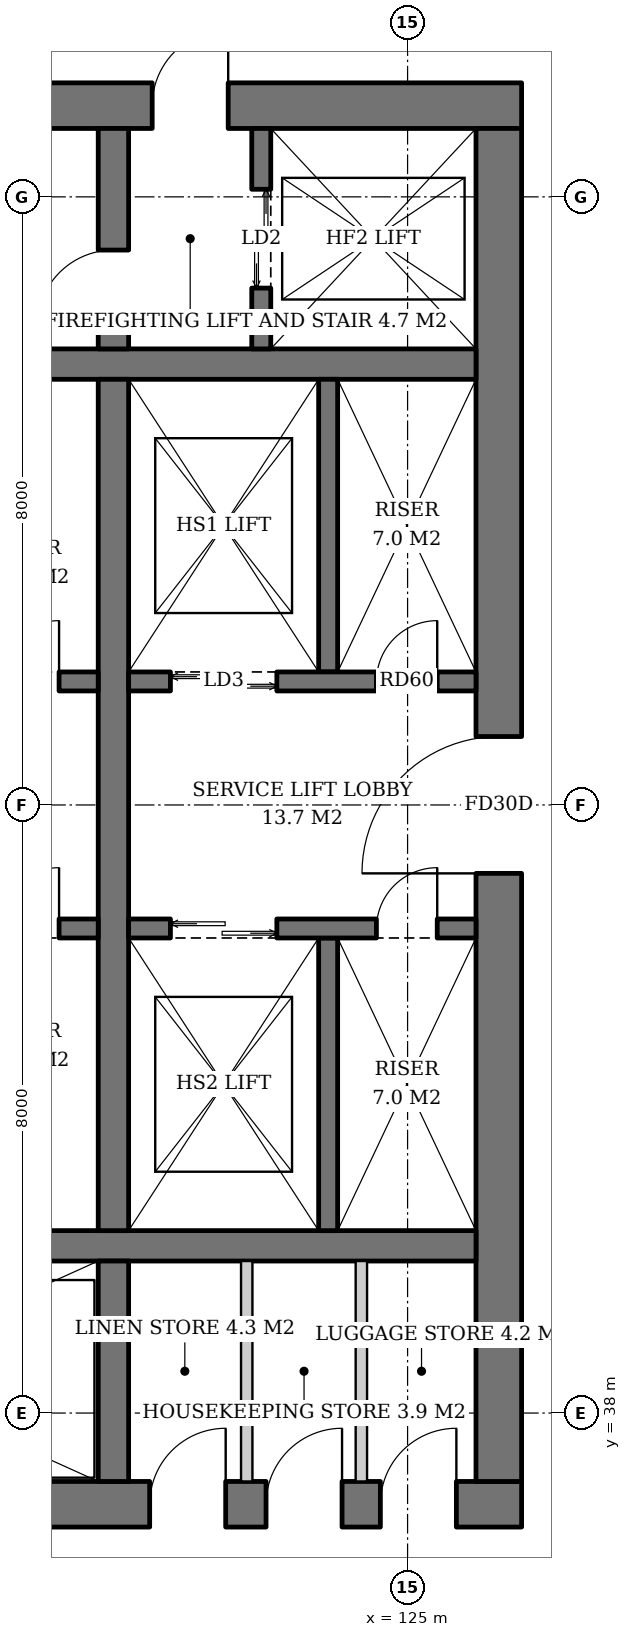
"""IFC4 building model, lengths in metres.
Left out: names, types, materials, properties, quantities, classifications, styles, units other than length and angle.
Written with IfcOpenShell. Run it as: python <this file> out.ifc"""

import sys

from ifc_helpers import new_model, si_unit, direction, frame, frame_2d, origin, place, context, subcontext, project, spatial, rectangle, extrude, element, fill, save


model = new_model("IFC4")
c1 = context("Model", 3, precision=1e-05, world=origin(), true_north=direction((0.0, 1.0)))
c2 = subcontext(c1, "Body", "Model", "MODEL_VIEW")
j1 = project(units=[si_unit("LENGTHUNIT", "METRE"), si_unit("PLANEANGLEUNIT", "RADIAN")], contexts=[c1])
p1 = place(None, origin())
s1 = spatial("IfcSite", under=j1, at=p1, CompositionType="ELEMENT")
p2 = place(p1, origin())
s2 = spatial("IfcBuilding", under=s1, at=p2, CompositionType="ELEMENT")
p3 = place(p2, frame((0.0, 0.0, 70.4)))
s3 = spatial("IfcBuildingStorey", under=s2, at=p3, CompositionType="ELEMENT", Elevation=70.4)
p4 = place(p3, frame((107.5, 36.8, 0.0), z_axis=(0.0, 0.0, 1.0), x_axis=(1.0, 0.0, 0.0)))
e1 = element("IfcWall", 1, at=p4, inside=s3, PredefinedType="SHEAR", context=c2, shape_type="SweptSolid", body=[
    extrude(rectangle(XDim=19.0, YDim=0.6, at=frame_2d((9.5, 0.0))), origin(), (0.0, 0.0, 1.0), 3.8),
])
p5 = place(p4, frame((3.9, 0.0, 0.0)))
e2 = element("IfcOpeningElement", 2, at=p5, cuts=e1, PredefinedType="OPENING", context=c2, shape_type="SweptSolid", body=[
    extrude(rectangle(XDim=1.0, YDim=2.1, at=frame_2d((0.5, 1.05))), frame((0.0, 0.31, 0.0), z_axis=(0.0, -1.0, 0.0), x_axis=(1.0, 0.0, 0.0)), (0.0, 0.0, 1.0), 0.62),
])
p6 = place(p4, frame((14.107, 0.0, 0.0)))
e3 = element("IfcOpeningElement", 3, at=p6, cuts=e1, PredefinedType="OPENING", context=c2, shape_type="SweptSolid", body=[
    extrude(rectangle(XDim=1.0, YDim=2.1, at=frame_2d((0.5, 1.05))), frame((0.0, 0.31, 0.0), z_axis=(0.0, -1.0, 0.0), x_axis=(1.0, 0.0, 0.0)), (0.0, 0.0, 1.0), 0.62),
])
p7 = place(p4, frame((15.638, 0.0, 0.0)))
e4 = element("IfcOpeningElement", 4, at=p7, cuts=e1, PredefinedType="OPENING", context=c2, shape_type="SweptSolid", body=[
    extrude(rectangle(XDim=1.0, YDim=2.1, at=frame_2d((0.5, 1.05))), frame((0.0, 0.31, 0.0), z_axis=(0.0, -1.0, 0.0), x_axis=(1.0, 0.0, 0.0)), (0.0, 0.0, 1.0), 0.62),
])
p8 = place(p4, frame((17.142, 0.0, 0.0)))
e5 = element("IfcOpeningElement", 5, at=p8, cuts=e1, PredefinedType="OPENING", context=c2, shape_type="SweptSolid", body=[
    extrude(rectangle(XDim=1.0, YDim=2.1, at=frame_2d((0.5, 1.05))), frame((0.0, 0.31, 0.0), z_axis=(0.0, -1.0, 0.0), x_axis=(1.0, 0.0, 0.0)), (0.0, 0.0, 1.0), 0.62),
])
p9 = place(p3, frame((107.5, 55.2, 0.0), z_axis=(0.0, 0.0, 1.0), x_axis=(1.0, 0.0, 0.0)))
e6 = element("IfcWall", 6, at=p9, inside=s3, PredefinedType="SHEAR", context=c2, shape_type="SweptSolid", body=[
    extrude(rectangle(XDim=19.0, YDim=0.6, at=frame_2d((9.5, 0.0))), origin(), (0.0, 0.0, 1.0), 3.8),
])
p10 = place(p9, frame((14.14, 0.0, 0.0)))
e7 = element("IfcOpeningElement", 7, at=p10, cuts=e6, PredefinedType="OPENING", context=c2, shape_type="SweptSolid", body=[
    extrude(rectangle(XDim=1.0, YDim=2.1, at=frame_2d((0.5, 1.05))), frame((0.0, 0.31, 0.0), z_axis=(0.0, -1.0, 0.0), x_axis=(1.0, 0.0, 0.0)), (0.0, 0.0, 1.0), 0.62),
])
p11 = place(p9, frame((1.024, 0.0, 0.0)))
e8 = element("IfcOpeningElement", 8, at=p11, cuts=e6, PredefinedType="OPENING", context=c2, shape_type="SweptSolid", body=[
    extrude(rectangle(XDim=1.0, YDim=2.1, at=frame_2d((0.5, 1.05))), frame((0.0, 0.31, 0.0), z_axis=(0.0, -1.0, 0.0), x_axis=(1.0, 0.0, 0.0)), (0.0, 0.0, 1.0), 0.62),
])
p12 = place(p9, frame((3.262, 0.0, 0.0)))
e9 = element("IfcOpeningElement", 9, at=p12, cuts=e6, PredefinedType="OPENING", context=c2, shape_type="SweptSolid", body=[
    extrude(rectangle(XDim=1.0, YDim=2.1, at=frame_2d((0.5, 1.05))), frame((0.0, 0.31, 0.0), z_axis=(0.0, -1.0, 0.0), x_axis=(1.0, 0.0, 0.0)), (0.0, 0.0, 1.0), 0.62),
])
p13 = place(p3, frame((126.2, 37.1, 0.0), z_axis=(0.0, 0.0, 1.0), x_axis=(0.0, 1.0, 0.0)))
e10 = element("IfcWall", 10, at=p13, inside=s3, PredefinedType="SHEAR", context=c2, shape_type="SweptSolid", body=[
    extrude(rectangle(XDim=17.8, YDim=0.6, at=frame_2d((8.9, 0.0))), origin(), (0.0, 0.0, 1.0), 3.8),
])
p14 = place(p13, frame((8.0, 0.0, 0.0)))
e11 = element("IfcOpeningElement", 11, at=p14, cuts=e10, PredefinedType="OPENING", context=c2, shape_type="SweptSolid", body=[
    extrude(rectangle(XDim=1.8, YDim=2.4, at=frame_2d((0.9, 1.2))), frame((0.0, 0.31, 0.0), z_axis=(0.0, -1.0, 0.0), x_axis=(1.0, 0.0, 0.0)), (0.0, 0.0, 1.0), 0.62),
])
for number, where, z_axis, x_axis in (
    (12, (108.1, 40.2, 0.0), (0.0, 0.0, 1.0), (1.0, 0.0, 0.0)),
    (13, (108.1, 51.8, 0.0), (0.0, 0.0, 1.0), (1.0, 0.0, 0.0)),
):
    element("IfcWall", number, at=place(p3, frame(where, z_axis=z_axis, x_axis=x_axis)), inside=s3, PredefinedType="SHEAR", context=c2, shape_type="SweptSolid", body=[
        extrude(rectangle(XDim=17.8, YDim=0.4, at=frame_2d((8.9, 0.0))), origin(), (0.0, 0.0, 1.0), 3.8),
    ])
p15 = place(p3, frame((121.13, 37.1, 0.0), z_axis=(0.0, 0.0, 1.0), x_axis=(0.0, 1.0, 0.0)))
e14 = element("IfcWall", 14, at=p15, inside=s3, PredefinedType="SHEAR", context=c2, shape_type="SweptSolid", body=[
    extrude(rectangle(XDim=2.9, YDim=0.4, at=frame_2d((1.45, 0.0))), origin(), (0.0, 0.0, 1.0), 3.8),
])
p16 = place(p3, frame((121.13, 40.4, 0.0), z_axis=(0.0, 0.0, 1.0), x_axis=(0.0, 1.0, 0.0)))
e15 = element("IfcWall", 15, at=p16, inside=s3, PredefinedType="SHEAR", context=c2, shape_type="SweptSolid", body=[
    extrude(rectangle(XDim=11.2, YDim=0.4, at=frame_2d((5.6, 0.0))), origin(), (0.0, 0.0, 1.0), 3.8),
])
p17 = place(p3, frame((121.13, 52.0, 0.0), z_axis=(0.0, 0.0, 1.0), x_axis=(0.0, 1.0, 0.0)))
e16 = element("IfcWall", 16, at=p17, inside=s3, PredefinedType="SHEAR", context=c2, shape_type="SweptSolid", body=[
    extrude(rectangle(XDim=2.9, YDim=0.4, at=frame_2d((1.45, 0.0))), origin(), (0.0, 0.0, 1.0), 3.8),
])
p18 = place(p17, frame((0.3, 0.0, 0.0)))
e17 = element("IfcOpeningElement", 17, at=p18, cuts=e16, PredefinedType="OPENING", context=c2, shape_type="SweptSolid", body=[
    extrude(rectangle(XDim=1.0, YDim=2.1, at=frame_2d((0.5, 1.05))), frame((0.0, 0.21, 0.0), z_axis=(0.0, -1.0, 0.0), x_axis=(1.0, 0.0, 0.0)), (0.0, 0.0, 1.0), 0.42),
])
p19 = place(p3, frame((123.075, 52.0, 0.0), z_axis=(0.0, 0.0, 1.0), x_axis=(0.0, 1.0, 0.0)))
e18 = element("IfcWall", 18, at=p19, inside=s3, PredefinedType="SHEAR", context=c2, shape_type="SweptSolid", body=[
    extrude(rectangle(XDim=2.9, YDim=0.25, at=frame_2d((1.45, 0.0))), origin(), (0.0, 0.0, 1.0), 3.8),
])
p20 = place(p19, frame((0.8, 0.0, 0.0)))
e19 = element("IfcOpeningElement", 19, at=p20, cuts=e18, PredefinedType="OPENING", context=c2, shape_type="SweptSolid", body=[
    extrude(rectangle(XDim=1.3, YDim=2.2, at=frame_2d((0.65, 1.1))), frame((0.0, 0.135, 0.0), z_axis=(0.0, -1.0, 0.0), x_axis=(1.0, 0.0, 0.0)), (0.0, 0.0, 1.0), 0.27),
])
p21 = place(p3, frame((108.1, 47.625, 0.0), z_axis=(0.0, 0.0, 1.0), x_axis=(1.0, 0.0, 0.0)))
e20 = element("IfcWall", 20, at=p21, inside=s3, PredefinedType="SHEAR", context=c2, shape_type="SweptSolid", body=[
    extrude(rectangle(XDim=12.83, YDim=0.25, at=frame_2d((6.415, 0.0))), origin(), (0.0, 0.0, 1.0), 3.8),
])
p22 = place(p21, frame((0.7, 0.0, 0.0)))
e21 = element("IfcOpeningElement", 21, at=p22, cuts=e20, PredefinedType="OPENING", context=c2, shape_type="SweptSolid", body=[
    extrude(rectangle(XDim=1.1, YDim=2.2, at=frame_2d((0.55, 1.1))), frame((0.0, 0.135, 0.0), z_axis=(0.0, -1.0, 0.0), x_axis=(1.0, 0.0, 0.0)), (0.0, 0.0, 1.0), 0.27),
])
p23 = place(p21, frame((3.45, 0.0, 0.0)))
e22 = element("IfcOpeningElement", 22, at=p23, cuts=e20, PredefinedType="OPENING", context=c2, shape_type="SweptSolid", body=[
    extrude(rectangle(XDim=1.1, YDim=2.2, at=frame_2d((0.55, 1.1))), frame((0.0, 0.135, 0.0), z_axis=(0.0, -1.0, 0.0), x_axis=(1.0, 0.0, 0.0)), (0.0, 0.0, 1.0), 0.27),
])
p24 = place(p21, frame((6.2, 0.0, 0.0)))
e23 = element("IfcOpeningElement", 23, at=p24, cuts=e20, PredefinedType="OPENING", context=c2, shape_type="SweptSolid", body=[
    extrude(rectangle(XDim=1.1, YDim=2.2, at=frame_2d((0.55, 1.1))), frame((0.0, 0.135, 0.0), z_axis=(0.0, -1.0, 0.0), x_axis=(1.0, 0.0, 0.0)), (0.0, 0.0, 1.0), 0.27),
])
p25 = place(p21, frame((8.95, 0.0, 0.0)))
e24 = element("IfcOpeningElement", 24, at=p25, cuts=e20, PredefinedType="OPENING", context=c2, shape_type="SweptSolid", body=[
    extrude(rectangle(XDim=1.1, YDim=2.2, at=frame_2d((0.55, 1.1))), frame((0.0, 0.135, 0.0), z_axis=(0.0, -1.0, 0.0), x_axis=(1.0, 0.0, 0.0)), (0.0, 0.0, 1.0), 0.27),
])
p26 = place(p21, frame((11.515, 0.0, 0.0)))
e25 = element("IfcOpeningElement", 25, at=p26, cuts=e20, PredefinedType="OPENING", context=c2, shape_type="SweptSolid", body=[
    extrude(rectangle(XDim=0.8, YDim=2.0, at=frame_2d((0.4, 1.0))), frame((0.0, 0.135, 0.0), z_axis=(0.0, -1.0, 0.0), x_axis=(1.0, 0.0, 0.0)), (0.0, 0.0, 1.0), 0.27),
])
p27 = place(p3, frame((108.1, 44.375, 0.0), z_axis=(0.0, 0.0, 1.0), x_axis=(1.0, 0.0, 0.0)))
e26 = element("IfcWall", 26, at=p27, inside=s3, PredefinedType="SHEAR", context=c2, shape_type="SweptSolid", body=[
    extrude(rectangle(XDim=12.83, YDim=0.25, at=frame_2d((6.415, 0.0))), origin(), (0.0, 0.0, 1.0), 3.8),
])
p28 = place(p27, frame((0.7, 0.0, 0.0)))
e27 = element("IfcOpeningElement", 27, at=p28, cuts=e26, PredefinedType="OPENING", context=c2, shape_type="SweptSolid", body=[
    extrude(rectangle(XDim=1.1, YDim=2.2, at=frame_2d((0.55, 1.1))), frame((0.0, 0.135, 0.0), z_axis=(0.0, -1.0, 0.0), x_axis=(1.0, 0.0, 0.0)), (0.0, 0.0, 1.0), 0.27),
])
p29 = place(p27, frame((3.45, 0.0, 0.0)))
e28 = element("IfcOpeningElement", 28, at=p29, cuts=e26, PredefinedType="OPENING", context=c2, shape_type="SweptSolid", body=[
    extrude(rectangle(XDim=1.1, YDim=2.2, at=frame_2d((0.55, 1.1))), frame((0.0, 0.135, 0.0), z_axis=(0.0, -1.0, 0.0), x_axis=(1.0, 0.0, 0.0)), (0.0, 0.0, 1.0), 0.27),
])
p30 = place(p27, frame((6.2, 0.0, 0.0)))
e29 = element("IfcOpeningElement", 29, at=p30, cuts=e26, PredefinedType="OPENING", context=c2, shape_type="SweptSolid", body=[
    extrude(rectangle(XDim=1.1, YDim=2.2, at=frame_2d((0.55, 1.1))), frame((0.0, 0.135, 0.0), z_axis=(0.0, -1.0, 0.0), x_axis=(1.0, 0.0, 0.0)), (0.0, 0.0, 1.0), 0.27),
])
p31 = place(p27, frame((9.0, 0.0, 0.0)))
e30 = element("IfcOpeningElement", 30, at=p31, cuts=e26, PredefinedType="OPENING", context=c2, shape_type="SweptSolid", body=[
    extrude(rectangle(XDim=1.0, YDim=2.1, at=frame_2d((0.5, 1.05))), frame((0.0, 0.135, 0.0), z_axis=(0.0, -1.0, 0.0), x_axis=(1.0, 0.0, 0.0)), (0.0, 0.0, 1.0), 0.27),
])
p32 = place(p27, frame((11.515, 0.0, 0.0)))
e31 = element("IfcOpeningElement", 31, at=p32, cuts=e26, PredefinedType="OPENING", context=c2, shape_type="SweptSolid", body=[
    extrude(rectangle(XDim=0.8, YDim=2.0, at=frame_2d((0.4, 1.0))), frame((0.0, 0.135, 0.0), z_axis=(0.0, -1.0, 0.0), x_axis=(1.0, 0.0, 0.0)), (0.0, 0.0, 1.0), 0.27),
])
p33 = place(p3, frame((123.955, 47.75, 0.0), z_axis=(0.0, 0.0, 1.0), x_axis=(0.0, 1.0, 0.0)))
e32 = element("IfcWall", 32, at=p33, inside=s3, PredefinedType="SHEAR", context=c2, shape_type="SweptSolid", body=[
    extrude(rectangle(XDim=3.85, YDim=0.25, at=frame_2d((1.925, 0.0))), origin(), (0.0, 0.0, 1.0), 3.8),
])
p34 = place(p3, frame((121.33, 47.625, 0.0), z_axis=(0.0, 0.0, 1.0), x_axis=(1.0, 0.0, 0.0)))
e33 = element("IfcWall", 33, at=p34, inside=s3, PredefinedType="SHEAR", context=c2, shape_type="SweptSolid", body=[
    extrude(rectangle(XDim=4.57, YDim=0.25, at=frame_2d((2.285, 0.0))), origin(), (0.0, 0.0, 1.0), 3.8),
])
p35 = place(p34, frame((0.55, 0.0, 0.0)))
e34 = element("IfcOpeningElement", 34, at=p35, cuts=e33, PredefinedType="OPENING", context=c2, shape_type="SweptSolid", body=[
    extrude(rectangle(XDim=1.4, YDim=2.4, at=frame_2d((0.7, 1.2))), frame((0.0, 0.135, 0.0), z_axis=(0.0, -1.0, 0.0), x_axis=(1.0, 0.0, 0.0)), (0.0, 0.0, 1.0), 0.27),
])
p36 = place(p34, frame((3.26, 0.0, 0.0)))
e35 = element("IfcOpeningElement", 35, at=p36, cuts=e33, PredefinedType="OPENING", context=c2, shape_type="SweptSolid", body=[
    extrude(rectangle(XDim=0.8, YDim=2.0, at=frame_2d((0.4, 1.0))), frame((0.0, 0.135, 0.0), z_axis=(0.0, -1.0, 0.0), x_axis=(1.0, 0.0, 0.0)), (0.0, 0.0, 1.0), 0.27),
])
p37 = place(p3, frame((123.955, 44.25, 0.0), z_axis=(0.0, 0.0, 1.0), x_axis=(0.0, -1.0, 0.0)))
e36 = element("IfcWall", 36, at=p37, inside=s3, PredefinedType="SHEAR", context=c2, shape_type="SweptSolid", body=[
    extrude(rectangle(XDim=3.85, YDim=0.25, at=frame_2d((1.925, 0.0))), origin(), (0.0, 0.0, 1.0), 3.8),
])
p38 = place(p3, frame((121.33, 44.375, 0.0), z_axis=(0.0, 0.0, 1.0), x_axis=(1.0, 0.0, 0.0)))
e37 = element("IfcWall", 37, at=p38, inside=s3, PredefinedType="SHEAR", context=c2, shape_type="SweptSolid", body=[
    extrude(rectangle(XDim=4.57, YDim=0.25, at=frame_2d((2.285, 0.0))), origin(), (0.0, 0.0, 1.0), 3.8),
])
p39 = place(p38, frame((0.55, 0.0, 0.0)))
e38 = element("IfcOpeningElement", 38, at=p39, cuts=e37, PredefinedType="OPENING", context=c2, shape_type="SweptSolid", body=[
    extrude(rectangle(XDim=1.4, YDim=2.4, at=frame_2d((0.7, 1.2))), frame((0.0, 0.135, 0.0), z_axis=(0.0, -1.0, 0.0), x_axis=(1.0, 0.0, 0.0)), (0.0, 0.0, 1.0), 0.27),
])
p40 = place(p38, frame((3.26, 0.0, 0.0)))
e39 = element("IfcOpeningElement", 39, at=p40, cuts=e37, PredefinedType="OPENING", context=c2, shape_type="SweptSolid", body=[
    extrude(rectangle(XDim=0.8, YDim=2.0, at=frame_2d((0.4, 1.0))), frame((0.0, 0.135, 0.0), z_axis=(0.0, -1.0, 0.0), x_axis=(1.0, 0.0, 0.0)), (0.0, 0.0, 1.0), 0.27),
])
for number, where, z_axis, x_axis in (
    (40, (122.884, 37.1, 0.0), (0.0, 0.0, 1.0), (0.0, 1.0, 0.0)),
    (41, (124.392, 37.1, 0.0), (0.0, 0.0, 1.0), (0.0, 1.0, 0.0)),
):
    element("IfcWall", number, at=place(p3, frame(where, z_axis=z_axis, x_axis=x_axis)), inside=s3, PredefinedType="SOLIDWALL", context=c2, shape_type="SweptSolid", body=[
        extrude(rectangle(XDim=2.9, YDim=0.15, at=frame_2d((1.45, 0.0))), origin(), (0.0, 0.0, 1.0), 3.6),
    ])
p41 = place(p20, origin())
e42 = element("IfcDoor", 42, at=p41, inside=s3, OperationType="DOUBLE_DOOR_SLIDING", PredefinedType="DOOR", context=c2, shape_type="SweptSolid", body=[
    extrude(rectangle(XDim=1.3, YDim=2.2, at=frame_2d((0.65, 1.1))), frame((0.0, 0.025, 0.0), z_axis=(0.0, -1.0, 0.0), x_axis=(1.0, 0.0, 0.0)), (0.0, 0.0, 1.0), 0.05),
])
fill(e19, e42)
p42 = place(p26, origin())
e43 = element("IfcDoor", 43, at=p42, inside=s3, OperationType="SINGLE_SWING_RIGHT", PredefinedType="DOOR", context=c2, shape_type="SweptSolid", body=[
    extrude(rectangle(XDim=0.8, YDim=2.0, at=frame_2d((0.4, 1.0))), frame((0.0, 0.025, 0.0), z_axis=(0.0, -1.0, 0.0), x_axis=(1.0, 0.0, 0.0)), (0.0, 0.0, 1.0), 0.05),
])
fill(e25, e43)
p43 = place(p32, origin())
e44 = element("IfcDoor", 44, at=p43, inside=s3, OperationType="SINGLE_SWING_RIGHT", PredefinedType="DOOR", context=c2, shape_type="SweptSolid", body=[
    extrude(rectangle(XDim=0.8, YDim=2.0, at=frame_2d((0.4, 1.0))), frame((0.0, 0.025, 0.0), z_axis=(0.0, -1.0, 0.0), x_axis=(1.0, 0.0, 0.0)), (0.0, 0.0, 1.0), 0.05),
])
fill(e31, e44)
p44 = place(p35, origin())
e45 = element("IfcDoor", 45, at=p44, inside=s3, OperationType="DOUBLE_DOOR_SLIDING", PredefinedType="DOOR", context=c2, shape_type="SweptSolid", body=[
    extrude(rectangle(XDim=1.4, YDim=2.4, at=frame_2d((0.7, 1.2))), frame((0.0, 0.025, 0.0), z_axis=(0.0, -1.0, 0.0), x_axis=(1.0, 0.0, 0.0)), (0.0, 0.0, 1.0), 0.05),
])
fill(e34, e45)
p45 = place(p36, origin())
e46 = element("IfcDoor", 46, at=p45, inside=s3, OperationType="SINGLE_SWING_RIGHT", PredefinedType="DOOR", context=c2, shape_type="SweptSolid", body=[
    extrude(rectangle(XDim=0.8, YDim=2.0, at=frame_2d((0.4, 1.0))), frame((0.0, 0.025, 0.0), z_axis=(0.0, -1.0, 0.0), x_axis=(1.0, 0.0, 0.0)), (0.0, 0.0, 1.0), 0.05),
])
fill(e35, e46)
p46 = place(p39, origin())
e47 = element("IfcDoor", 47, at=p46, inside=s3, OperationType="DOUBLE_DOOR_SLIDING", PredefinedType="DOOR", context=c2, shape_type="SweptSolid", body=[
    extrude(rectangle(XDim=1.4, YDim=2.4, at=frame_2d((0.7, 1.2))), frame((0.0, 0.025, 0.0), z_axis=(0.0, -1.0, 0.0), x_axis=(1.0, 0.0, 0.0)), (0.0, 0.0, 1.0), 0.05),
])
fill(e38, e47)
p47 = place(p40, origin())
e48 = element("IfcDoor", 48, at=p47, inside=s3, OperationType="SINGLE_SWING_RIGHT", PredefinedType="DOOR", context=c2, shape_type="SweptSolid", body=[
    extrude(rectangle(XDim=0.8, YDim=2.0, at=frame_2d((0.4, 1.0))), frame((0.0, 0.025, 0.0), z_axis=(0.0, -1.0, 0.0), x_axis=(1.0, 0.0, 0.0)), (0.0, 0.0, 1.0), 0.05),
])
fill(e39, e48)
p48 = place(p18, origin())
e49 = element("IfcDoor", 49, at=p48, inside=s3, OperationType="SINGLE_SWING_LEFT", PredefinedType="DOOR", context=c2, shape_type="SweptSolid", body=[
    extrude(rectangle(XDim=1.0, YDim=2.1, at=frame_2d((0.5, 1.05))), frame((0.0, 0.025, 0.0), z_axis=(0.0, -1.0, 0.0), x_axis=(1.0, 0.0, 0.0)), (0.0, 0.0, 1.0), 0.05),
])
fill(e17, e49)
p49 = place(p10, origin())
e50 = element("IfcDoor", 50, at=p49, inside=s3, OperationType="SINGLE_SWING_RIGHT", PredefinedType="DOOR", context=c2, shape_type="SweptSolid", body=[
    extrude(rectangle(XDim=1.0, YDim=2.1, at=frame_2d((0.5, 1.05))), frame((0.0, 0.025, 0.0), z_axis=(0.0, -1.0, 0.0), x_axis=(1.0, 0.0, 0.0)), (0.0, 0.0, 1.0), 0.05),
])
fill(e7, e50)
p50 = place(p14, origin())
e51 = element("IfcDoor", 51, at=p50, inside=s3, OperationType="DOUBLE_DOOR_SINGLE_SWING", PredefinedType="DOOR", context=c2, shape_type="SweptSolid", body=[
    extrude(rectangle(XDim=1.8, YDim=2.4, at=frame_2d((0.9, 1.2))), frame((0.0, 0.025, 0.0), z_axis=(0.0, -1.0, 0.0), x_axis=(1.0, 0.0, 0.0)), (0.0, 0.0, 1.0), 0.05),
])
fill(e11, e51)
p51 = place(p6, origin())
e52 = element("IfcDoor", 52, at=p51, inside=s3, OperationType="SINGLE_SWING_RIGHT", PredefinedType="DOOR", context=c2, shape_type="SweptSolid", body=[
    extrude(rectangle(XDim=1.0, YDim=2.1, at=frame_2d((0.5, 1.05))), frame((0.0, 0.29, 0.0), z_axis=(0.0, -1.0, 0.0), x_axis=(1.0, 0.0, 0.0)), (0.0, 0.0, 1.0), 0.05),
])
fill(e3, e52)
p52 = place(p7, origin())
e53 = element("IfcDoor", 53, at=p52, inside=s3, OperationType="SINGLE_SWING_RIGHT", PredefinedType="DOOR", context=c2, shape_type="SweptSolid", body=[
    extrude(rectangle(XDim=1.0, YDim=2.1, at=frame_2d((0.5, 1.05))), frame((0.0, 0.29, 0.0), z_axis=(0.0, -1.0, 0.0), x_axis=(1.0, 0.0, 0.0)), (0.0, 0.0, 1.0), 0.05),
])
fill(e4, e53)
p53 = place(p8, origin())
e54 = element("IfcDoor", 54, at=p53, inside=s3, OperationType="SINGLE_SWING_RIGHT", PredefinedType="DOOR", context=c2, shape_type="SweptSolid", body=[
    extrude(rectangle(XDim=1.0, YDim=2.1, at=frame_2d((0.5, 1.05))), frame((0.0, 0.29, 0.0), z_axis=(0.0, -1.0, 0.0), x_axis=(1.0, 0.0, 0.0)), (0.0, 0.0, 1.0), 0.05),
])
fill(e5, e54)
save(model, sys.argv[1])
